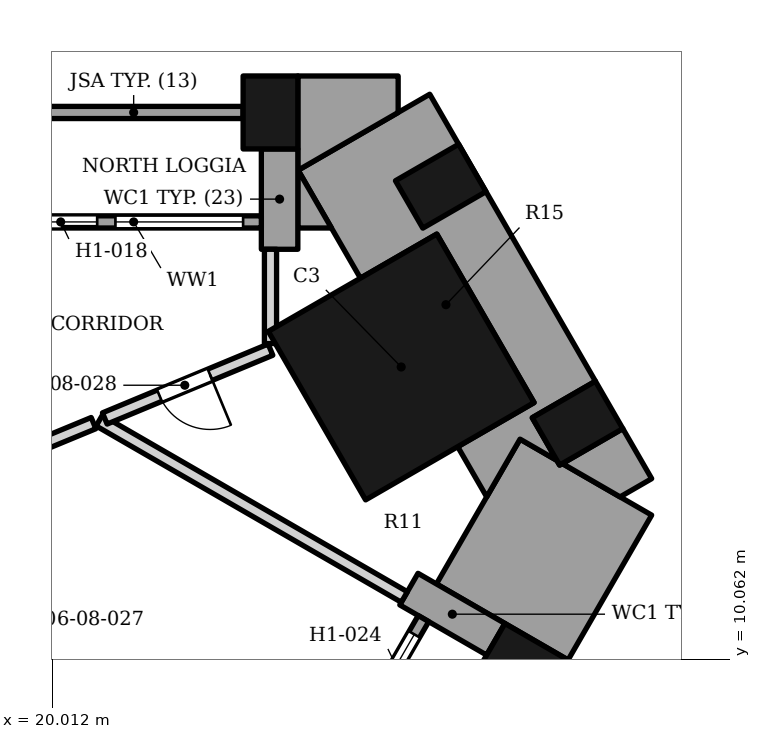
"""IFC4 building model, lengths in metres.
Left out: names, types, materials, properties, quantities, classifications, styles, units other than length and angle.
Written with IfcOpenShell. Run it as: python <this file> out.ifc"""

import sys

from ifc_helpers import new_model, si_unit, direction, frame, frame_2d, origin, origin_2d, place, context, subcontext, project, spatial, polyline, rectangle, outline, extrude, element, fill, save


model = new_model("IFC4")
c1 = context("Model", 3, precision=1e-05, world=origin(), true_north=direction((0.0, 1.0)))
c2 = subcontext(c1, "Body", "Model", "MODEL_VIEW")
j1 = project(units=[si_unit("LENGTHUNIT", "METRE"), si_unit("PLANEANGLEUNIT", "RADIAN")], contexts=[c1])
p1 = place(None, origin())
s1 = spatial("IfcSite", under=j1, at=p1, CompositionType="ELEMENT")
p2 = place(p1, origin())
s2 = spatial("IfcBuilding", under=s1, at=p2, CompositionType="ELEMENT")
p3 = place(p2, frame((0.0, 0.0, 46.0)))
s3 = spatial("IfcBuildingStorey", under=s2, at=p3, CompositionType="ELEMENT", Elevation=46.0)
p4 = place(p3, frame((25.75, 14.867, 0.0), z_axis=(0.0, 0.0, 1.0), x_axis=(-0.866025386331, -0.50000003023, 0.0)))
e1 = element("IfcColumn", 1, at=p4, inside=s3, PredefinedType="COLUMN", context=c2, shape_type="SweptSolid", body=[
    extrude(rectangle(XDim=3.2, YDim=3.2, at=origin_2d()), origin(), (0.0, 0.0, 1.0), 3.4),
])
for number, where, z_axis, x_axis in (
    (2, (27.75, 9.959, 0.0), (0.0, 0.0, 1.0), (0.5, 0.866, 0.0)),
    (3, (28.65, 13.943, 0.0), (0.0, 0.0, 1.0), (-0.5, 0.866, 0.0)),
    (4, (26.4, 17.84, 0.0), (0.0, 0.0, 1.0), (-0.5, 0.866, 0.0)),
    (5, (23.6, 19.053, 0.0), (0.0, 0.0, 1.0), (-1.0, 0.0, 0.0)),
):
    element("IfcColumn", number, at=place(p3, frame(where, z_axis=z_axis, x_axis=x_axis)), inside=s3, PredefinedType="COLUMN", context=c2, shape_type="SweptSolid", body=[
        extrude(rectangle(XDim=0.9, YDim=1.2, at=origin_2d()), origin(), (0.0, 0.0, 1.0), 3.4),
    ])
p5 = place(p3, frame((25.876, 11.214, 0.0), z_axis=(0.0, 0.0, 1.0), x_axis=(0.866040211805, -0.499974350878, 0.0)))
e6 = element("IfcWall", 6, at=p5, inside=s3, PredefinedType="SOLIDWALL", context=c2, shape_type="SweptSolid", body=[
    extrude(rectangle(XDim=1.65, YDim=0.6, at=frame_2d((0.825, 0.0))), origin(), (0.0, 0.0, 1.0), 2.65),
])
p6 = place(p3, frame((24.016, 7.092, 0.0), z_axis=(0.0, 0.0, 1.0), x_axis=(0.500002543286, 0.866023935413, 0.0)))
e7 = element("IfcWall", 7, at=p6, inside=s3, PredefinedType="ELEMENTEDWALL", context=c2, shape_type="SweptSolid", body=[
    extrude(rectangle(XDim=4.2, YDim=0.2, at=frame_2d((2.1, 0.0))), origin(), (0.0, 0.0, 1.0), 2.65),
])
p7 = place(p6, frame((0.3, 0.0, 0.6)))
e8 = element("IfcOpeningElement", 8, at=p7, cuts=e7, PredefinedType="OPENING", context=c2, shape_type="SweptSolid", body=[
    extrude(rectangle(XDim=2.1, YDim=1.8, at=frame_2d((1.05, 0.9))), frame((0.0, 0.11, 0.0), z_axis=(0.0, -1.0, 0.0), x_axis=(1.0, 0.0, 0.0)), (0.0, 0.0, 1.0), 0.22),
])
p8 = place(p6, frame((2.7, 0.0, 0.0)))
e9 = element("IfcOpeningElement", 9, at=p8, cuts=e7, PredefinedType="OPENING", context=c2, shape_type="SweptSolid", body=[
    extrude(rectangle(XDim=1.2, YDim=2.4, at=frame_2d((0.6, 1.2))), frame((0.0, 0.11, 0.0), z_axis=(0.0, -1.0, 0.0), x_axis=(1.0, 0.0, 0.0)), (0.0, 0.0, 1.0), 0.22),
])
p9 = place(p3, origin())
e10 = element("IfcWall", 10, at=p9, inside=s3, PredefinedType="SOLIDWALL", context=c2, shape_type="SweptSolid", body=[
    extrude(outline(polyline([(24.05, 16.802), (24.05, 18.453), (23.45, 18.453), (23.45, 16.802), (24.05, 16.802)])), origin(), (0.0, 0.0, 1.0), 2.63),
])
p10 = place(p3, frame((23.15, 19.052, 0.0), z_axis=(0.0, 0.0, 1.0), x_axis=(-1.0, 0.0, 0.0)))
e11 = element("IfcWall", 11, at=p10, inside=s3, PredefinedType="SOLIDWALL", context=c2, shape_type="SweptSolid", body=[
    extrude(rectangle(XDim=3.6, YDim=0.2, at=frame_2d((1.8, 0.0))), origin(), (0.0, 0.0, 1.0), 2.65),
])
p11 = place(p3, frame((23.45, 17.252, 0.0), z_axis=(0.0, 0.0, 1.0), x_axis=(-1.0, 0.0, 0.0)))
e12 = element("IfcWall", 12, at=p11, inside=s3, PredefinedType="ELEMENTEDWALL", context=c2, shape_type="SweptSolid", body=[
    extrude(rectangle(XDim=4.2, YDim=0.2, at=frame_2d((2.1, 0.0))), origin(), (0.0, 0.0, 1.0), 2.65),
])
p12 = place(p11, frame((0.3, 0.0, 0.6)))
e13 = element("IfcOpeningElement", 13, at=p12, cuts=e12, PredefinedType="OPENING", context=c2, shape_type="SweptSolid", body=[
    extrude(rectangle(XDim=2.1, YDim=1.8, at=frame_2d((1.05, 0.9))), frame((0.0, 0.11, 0.0), z_axis=(0.0, -1.0, 0.0), x_axis=(1.0, 0.0, 0.0)), (0.0, 0.0, 1.0), 0.22),
])
p13 = place(p11, frame((2.7, 0.0, 0.0)))
e14 = element("IfcOpeningElement", 14, at=p13, cuts=e12, PredefinedType="OPENING", context=c2, shape_type="SweptSolid", body=[
    extrude(rectangle(XDim=1.2, YDim=2.4, at=frame_2d((0.6, 1.2))), frame((0.0, 0.11, 0.0), z_axis=(0.0, -1.0, 0.0), x_axis=(1.0, 0.0, 0.0)), (0.0, 0.0, 1.0), 0.22),
])
p14 = place(p3, origin())
e15 = element("IfcWall", 15, at=p14, inside=s3, PredefinedType="SOLIDWALL", context=c2, shape_type="SweptSolid", body=[
    extrude(outline(polyline([(28.495, 10.049), (29.87, 12.431), (28.4, 13.279), (28.355, 13.253), (28.311, 13.331), (27.705, 13.681), (26.33, 11.299), (28.495, 10.049)])), origin(), (0.0, 0.0, 1.0), 2.63),
])
p15 = place(p3, origin())
e16 = element("IfcWall", 16, at=p15, inside=s3, PredefinedType="SOLIDWALL", context=c2, shape_type="SweptSolid", body=[
    extrude(outline(polyline([(29.35, 12.73), (29.87, 13.031), (29.395, 13.853), (28.4, 13.279), (29.35, 12.73)])), origin(), (0.0, 0.0, 1.0), 2.63),
])
p16 = place(p3, origin())
e17 = element("IfcWall", 17, at=p16, inside=s3, PredefinedType="SOLIDWALL", context=c2, shape_type="SweptSolid", body=[
    extrude(outline(polyline([(27.936, 14.281), (26.679, 13.556), (27.156, 12.73), (27.705, 13.681), (28.311, 13.331), (27.905, 14.033), (28.945, 14.633), (26.22, 19.353), (24.054, 18.103), (25.079, 16.327), (26.336, 17.053), (27.936, 14.281)])), origin(), (0.0, 0.0, 1.0), 2.63),
])
p17 = place(p3, origin())
e18 = element("IfcWall", 18, at=p17, inside=s3, PredefinedType="SOLIDWALL", context=c2, shape_type="SweptSolid", body=[
    extrude(outline(polyline([(24.05, 19.653), (24.05, 17.153), (24.603, 17.153), (24.054, 18.103), (25.7, 19.052), (25.7, 19.653), (24.05, 19.653)])), origin(), (0.0, 0.0, 1.0), 2.63),
])
p18 = place(p3, frame((19.593, 13.49, 0.0), z_axis=(0.0, 0.0, 1.0), x_axis=(0.924174624958, 0.381970237825, 0.0)))
e19 = element("IfcWall", 19, at=p18, inside=s3, PredefinedType="PARTITIONING", context=c2, shape_type="SweptSolid", body=[
    extrude(rectangle(XDim=1.187, YDim=0.2, at=frame_2d((0.594, 0.0))), origin(), (0.0, 0.0, 1.0), 3.23),
])
p19 = place(p3, frame((20.783, 13.984, 0.0), z_axis=(0.0, 0.0, 1.0), x_axis=(0.865879670097, -0.50025233324, 0.0)))
e20 = element("IfcWall", 20, at=p19, inside=s3, PredefinedType="PARTITIONING", context=c2, shape_type="SweptSolid", body=[
    extrude(rectangle(XDim=5.796, YDim=0.2, at=frame_2d((2.898, 0.0))), origin(), (0.0, 0.0, 1.0), 3.23),
])
p20 = place(p3, frame((20.875, 14.021, 0.0), z_axis=(0.0, 0.0, 1.0), x_axis=(0.923541353386, 0.383498850828, 0.0)))
e21 = element("IfcWall", 21, at=p20, inside=s3, PredefinedType="PARTITIONING", context=c2, shape_type="SweptSolid", body=[
    extrude(rectangle(XDim=2.951, YDim=0.2, at=frame_2d((1.475, 0.0))), origin(), (0.0, 0.0, 1.0), 3.23),
])
p21 = place(p20, frame((0.975, 0.0, 0.0)))
e22 = element("IfcOpeningElement", 22, at=p21, cuts=e21, PredefinedType="OPENING", context=c2, shape_type="SweptSolid", body=[
    extrude(rectangle(XDim=0.9, YDim=2.1, at=frame_2d((0.45, 1.05))), frame((0.0, 0.11, 0.0), z_axis=(0.0, -1.0, 0.0), x_axis=(1.0, 0.0, 0.0)), (0.0, 0.0, 1.0), 0.22),
])
p22 = place(p3, frame((23.6, 15.252, 0.0), z_axis=(0.0, 0.0, 1.0), x_axis=(0.000157480313, 0.9999999876, 0.0)))
e23 = element("IfcWall", 23, at=p22, inside=s3, PredefinedType="PARTITIONING", context=c2, shape_type="SweptSolid", body=[
    extrude(rectangle(XDim=1.55, YDim=0.2, at=frame_2d((0.775, 0.0))), origin(), (0.0, 0.0, 1.0), 3.23),
])
p23 = place(p8, origin())
e24 = element("IfcDoor", 24, at=p23, inside=s3, OperationType="SINGLE_SWING_LEFT", PredefinedType="DOOR", context=c2, shape_type="SweptSolid", body=[
    extrude(rectangle(XDim=1.2, YDim=2.4, at=frame_2d((0.6, 1.2))), frame((0.0, 0.025, 0.0), z_axis=(0.0, -1.0, 0.0), x_axis=(1.0, 0.0, 0.0)), (0.0, 0.0, 1.0), 0.05),
])
fill(e9, e24)
p24 = place(p12, origin())
e25 = element("IfcWindow", 25, at=p24, inside=s3, PartitioningType="SINGLE_PANEL", PredefinedType="WINDOW", context=c2, shape_type="SweptSolid", body=[
    extrude(rectangle(XDim=2.1, YDim=1.8, at=frame_2d((1.05, 0.9))), frame((0.0, 0.03, 0.0), z_axis=(0.0, -1.0, 0.0), x_axis=(1.0, 0.0, 0.0)), (0.0, 0.0, 1.0), 0.06),
])
fill(e13, e25)
p25 = place(p13, origin())
e26 = element("IfcDoor", 26, at=p25, inside=s3, OperationType="SINGLE_SWING_LEFT", PredefinedType="DOOR", context=c2, shape_type="SweptSolid", body=[
    extrude(rectangle(XDim=1.2, YDim=2.4, at=frame_2d((0.6, 1.2))), frame((0.0, 0.025, 0.0), z_axis=(0.0, -1.0, 0.0), x_axis=(1.0, 0.0, 0.0)), (0.0, 0.0, 1.0), 0.05),
])
fill(e14, e26)
p26 = place(p21, origin())
e27 = element("IfcDoor", 27, at=p26, inside=s3, OperationType="SINGLE_SWING_RIGHT", PredefinedType="DOOR", context=c2, shape_type="SweptSolid", body=[
    extrude(rectangle(XDim=0.9, YDim=2.1, at=frame_2d((0.45, 1.05))), frame((0.0, 0.025, 0.0), z_axis=(0.0, -1.0, 0.0), x_axis=(1.0, 0.0, 0.0)), (0.0, 0.0, 1.0), 0.05),
])
fill(e22, e27)
save(model, sys.argv[1])
